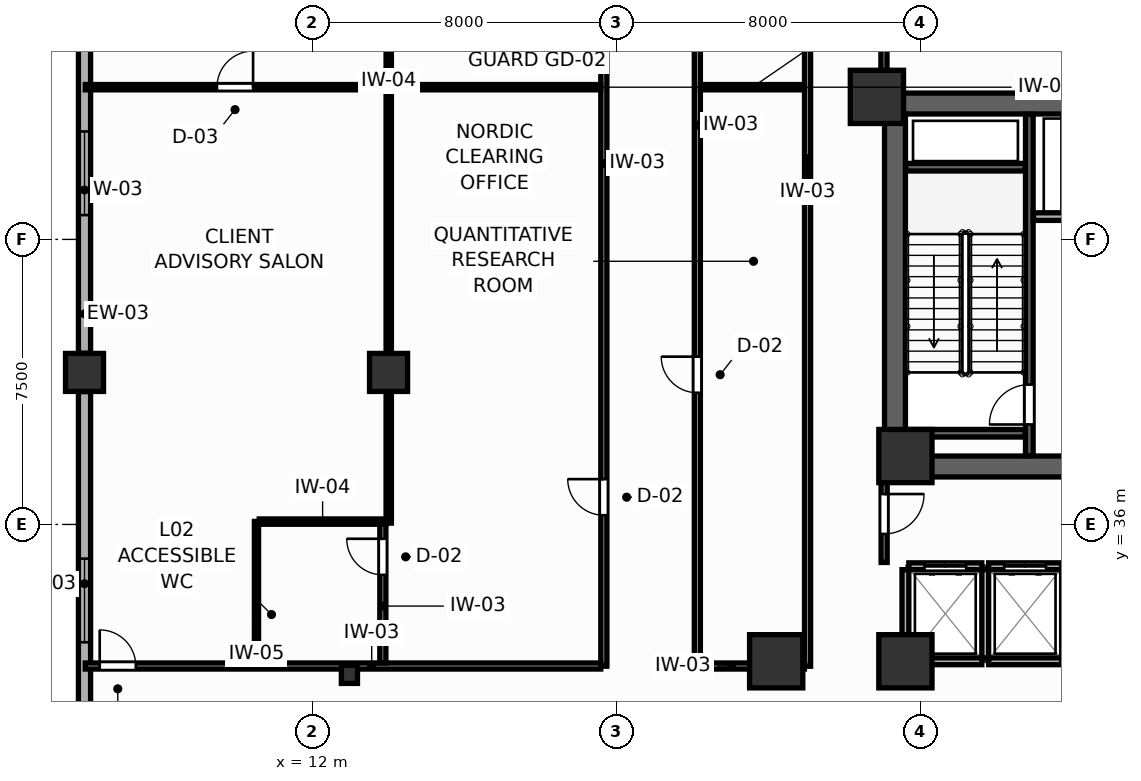
"""IFC4 building model, lengths in metres.
Left out: names, types, materials, properties, quantities, classifications, styles, units other than length and angle.
Written with IfcOpenShell. Run it as: python <this file> out.ifc"""

import sys

from ifc_helpers import new_model, si_unit, direction, frame, frame_2d, origin, origin_2d, place, context, subcontext, project, spatial, rectangle, i_section, extrude, source, transform, mapped, element, fill, save


model = new_model("IFC4")
c1 = context("Model", 3, precision=1e-05, world=origin(), true_north=direction((0.0, 1.0)))
c2 = subcontext(c1, "Body", "Model", "MODEL_VIEW")
j1 = project(units=[si_unit("LENGTHUNIT", "METRE"), si_unit("PLANEANGLEUNIT", "RADIAN")], contexts=[c1])
p1 = place(None, origin())
s1 = spatial("IfcSite", under=j1, at=p1, CompositionType="ELEMENT")
p2 = place(p1, origin())
s2 = spatial("IfcBuilding", under=s1, at=p2, CompositionType="ELEMENT")
p3 = place(p2, frame((0.0, 0.0, 9.6)))
s3 = spatial("IfcBuildingStorey", under=s2, at=p3, CompositionType="ELEMENT", Elevation=9.6)
p4 = place(p3, frame((27.05, 47.075, 0.0), z_axis=(0.0, 0.0, 1.0), x_axis=(1.0, 0.0, 0.0)))
e1 = element("IfcWall", 1, at=p4, inside=s3, PredefinedType="SHEAR", context=c2, shape_type="SweptSolid", body=[
    extrude(rectangle(XDim=17.9, YDim=0.55, at=frame_2d((8.95, 0.0))), origin(), (0.0, 0.0, 1.0), 4.8),
])
p5 = place(p3, frame((27.05, 37.525, 0.0), z_axis=(0.0, 0.0, 1.0), x_axis=(1.0, 0.0, 0.0)))
e2 = element("IfcWall", 2, at=p5, inside=s3, PredefinedType="SHEAR", context=c2, shape_type="SweptSolid", body=[
    extrude(rectangle(XDim=17.9, YDim=0.55, at=frame_2d((8.95, 0.0))), origin(), (0.0, 0.0, 1.0), 4.8),
])
p6 = place(p5, frame((4.975, 0.0, 0.0)))
e3 = element("IfcOpeningElement", 3, at=p6, cuts=e2, PredefinedType="OPENING", context=c2, shape_type="SweptSolid", body=[
    extrude(rectangle(XDim=1.05, YDim=2.1, at=frame_2d((0.525, 1.05))), frame((0.0, 0.285, 0.0), z_axis=(0.0, -1.0, 0.0), x_axis=(1.0, 0.0, 0.0)), (0.0, 0.0, 1.0), 0.57),
])
p7 = place(p5, frame((11.875, 0.0, 0.0)))
e4 = element("IfcOpeningElement", 4, at=p7, cuts=e2, PredefinedType="OPENING", context=c2, shape_type="SweptSolid", body=[
    extrude(rectangle(XDim=1.05, YDim=2.1, at=frame_2d((0.525, 1.05))), frame((0.0, 0.285, 0.0), z_axis=(0.0, -1.0, 0.0), x_axis=(1.0, 0.0, 0.0)), (0.0, 0.0, 1.0), 0.57),
])
p8 = place(p3, frame((27.325, 37.8, 0.0), z_axis=(0.0, 0.0, 1.0), x_axis=(0.0, 1.0, 0.0)))
e5 = element("IfcWall", 5, at=p8, inside=s3, PredefinedType="SHEAR", context=c2, shape_type="SweptSolid", body=[
    extrude(rectangle(XDim=9.0, YDim=0.55, at=frame_2d((4.5, 0.0))), origin(), (0.0, 0.0, 1.0), 4.8),
])
m1 = source(origin(), c2, "Body", "SweptSolid", [
    extrude(rectangle(XDim=1.4, YDim=1.4, at=origin_2d()), origin(), (0.0, 0.0, 1.0), 4.8),
])
for number, where, z_axis, x_axis in (
    (6, (26.85, 47.25, 0.0), (0.0, 0.0, 1.0), (1.0, 0.0, 0.0)),
    (7, (27.6, 37.8, 0.0), (0.0, 0.0, 1.0), (1.0, 0.0, 0.0)),
    (8, (27.6, 32.4, 0.0), (0.0, 0.0, 1.0), (1.0, 0.0, 0.0)),
    (9, (24.2, 32.4, 0.0), (0.0, 0.0, 1.0), (1.0, 0.0, 0.0)),
):
    element("IfcColumn", number, at=place(p3, frame(where, z_axis=z_axis, x_axis=x_axis)), inside=s3, PredefinedType="COLUMN", context=c2, shape_type="MappedRepresentation", body=[
        mapped(m1, transform((0.0, 0.0, 0.0), scale=1.0)),
    ])
m2 = source(origin(), c2, "Body", "SweptSolid", [
    extrude(rectangle(XDim=1.0, YDim=1.0, at=origin_2d()), origin(), (0.0, 0.0, 1.0), 4.8),
])
for number, where, z_axis, x_axis in (
    (10, (6.0, 40.0, 0.0), (0.0, 0.0, 1.0), (1.0, 0.0, 0.0)),
    (11, (14.0, 40.0, 0.0), (0.0, 0.0, 1.0), (1.0, 0.0, 0.0)),
):
    element("IfcColumn", number, at=place(p3, frame(where, z_axis=z_axis, x_axis=x_axis)), inside=s3, PredefinedType="COLUMN", context=c2, shape_type="MappedRepresentation", body=[
        mapped(m2, transform((0.0, 0.0, 0.0), scale=1.0)),
    ])
m3 = source(origin(), c2, "Body", "SweptSolid", [
    extrude(i_section(OverallWidth=0.424, OverallDepth=0.474, WebThickness=0.045, FlangeThickness=0.072, FilletRadius=0.015, at=origin_2d()), origin(), (0.0, 0.0, 1.0), 4.8),
])
p9 = place(p3, frame((12.97, 32.054, 0.0), z_axis=(0.0, 0.0, 1.0), x_axis=(1.0, 0.0, 0.0)))
e12 = element("IfcColumn", 12, at=p9, inside=s3, PredefinedType="COLUMN", context=c2, shape_type="MappedRepresentation", body=[
    mapped(m3, transform((0.0, 0.0, 0.0), scale=1.0)),
])
p10 = place(p3, frame((6.0, 28.505, 0.0), z_axis=(0.0, 0.0, 1.0), x_axis=(0.0, 1.0, 0.0)))
e13 = element("IfcWall", 13, at=p10, inside=s3, PredefinedType="SOLIDWALL", context=c2, shape_type="SweptSolid", body=[
    extrude(rectangle(XDim=10.99, YDim=0.32, at=frame_2d((5.495, 0.0))), origin(), (0.0, 0.0, 1.0), 4.35),
])
p11 = place(p10, frame((4.395, 0.0, 0.75)))
e14 = element("IfcOpeningElement", 14, at=p11, cuts=e13, PredefinedType="OPENING", context=c2, shape_type="SweptSolid", body=[
    extrude(rectangle(XDim=2.2, YDim=2.0, at=frame_2d((1.1, 1.0))), frame((0.0, 0.17, 0.0), z_axis=(0.0, -1.0, 0.0), x_axis=(1.0, 0.0, 0.0)), (0.0, 0.0, 1.0), 0.34),
])
p12 = place(p3, frame((6.0, 40.505, 0.0), z_axis=(0.0, 0.0, 1.0), x_axis=(0.0, 1.0, 0.0)))
e15 = element("IfcWall", 15, at=p12, inside=s3, PredefinedType="SOLIDWALL", context=c2, shape_type="SweptSolid", body=[
    extrude(rectangle(XDim=9.47, YDim=0.32, at=frame_2d((4.735, 0.0))), origin(), (0.0, 0.0, 1.0), 4.35),
])
p13 = place(p12, frame((3.635, 0.0, 0.75)))
e16 = element("IfcOpeningElement", 16, at=p13, cuts=e15, PredefinedType="OPENING", context=c2, shape_type="SweptSolid", body=[
    extrude(rectangle(XDim=2.2, YDim=2.0, at=frame_2d((1.1, 1.0))), frame((0.0, 0.17, 0.0), z_axis=(0.0, -1.0, 0.0), x_axis=(1.0, 0.0, 0.0)), (0.0, 0.0, 1.0), 0.34),
])
p14 = place(p3, frame((30.86, 37.81, 0.0), z_axis=(0.0, 0.0, 1.0), x_axis=(0.0, 1.0, 0.0)))
e17 = element("IfcWall", 17, at=p14, inside=s3, PredefinedType="SHEAR", context=c2, shape_type="SweptSolid", body=[
    extrude(rectangle(XDim=8.98, YDim=0.2, at=frame_2d((4.49, 0.0))), origin(), (0.0, 0.0, 1.0), 4.8),
])
p15 = place(p14, frame((0.82, 0.0, 0.0)))
e18 = element("IfcOpeningElement", 18, at=p15, cuts=e17, PredefinedType="OPENING", context=c2, shape_type="SweptSolid", body=[
    extrude(rectangle(XDim=1.05, YDim=2.1, at=frame_2d((0.525, 1.05))), frame((0.0, 0.11, 0.0), z_axis=(0.0, -1.0, 0.0), x_axis=(1.0, 0.0, 0.0)), (0.0, 0.0, 1.0), 0.22),
])
for number, where, z_axis, x_axis in (
    (19, (27.61, 45.4, 0.0), (0.0, 0.0, 1.0), (1.0, 0.0, 0.0)),
    (20, (27.61, 38.4, 0.0), (0.0, 0.0, 1.0), (1.0, 0.0, 0.0)),
):
    element("IfcWall", number, at=place(p3, frame(where, z_axis=z_axis, x_axis=x_axis)), inside=s3, PredefinedType="SHEAR", context=c2, shape_type="SweptSolid", body=[
        extrude(rectangle(XDim=3.14, YDim=0.2, at=frame_2d((1.57, 0.0))), origin(), (0.0, 0.0, 1.0), 4.8),
    ])
p16 = place(p3, frame((30.97, 44.1, 0.0), z_axis=(0.0, 0.0, 1.0), x_axis=(1.0, 0.0, 0.0)))
e21 = element("IfcWall", 21, at=p16, inside=s3, PredefinedType="PARTITIONING", context=c2, shape_type="SweptSolid", body=[
    extrude(rectangle(XDim=3.38, YDim=0.2, at=frame_2d((1.69, 0.0))), origin(), (0.0, 0.0, 1.0), 4.35),
])
p17 = place(p16, frame((0.9, 0.0, 0.0)))
e22 = element("IfcOpeningElement", 22, at=p17, cuts=e21, PredefinedType="OPENING", context=c2, shape_type="SweptSolid", body=[
    extrude(rectangle(XDim=1.2, YDim=2.1, at=frame_2d((0.6, 1.05))), frame((0.0, 0.11, 0.0), z_axis=(0.0, -1.0, 0.0), x_axis=(1.0, 0.0, 0.0)), (0.0, 0.0, 1.0), 0.22),
])
p18 = place(p3, frame((27.69, 34.9, 0.0), z_axis=(0.0, 0.0, 1.0), x_axis=(1.0, 0.0, 0.0)))
e23 = element("IfcWall", 23, at=p18, inside=s3, PredefinedType="PARTITIONING", context=c2, shape_type="SweptSolid", body=[
    extrude(rectangle(XDim=1.92, YDim=0.18, at=frame_2d((0.96, 0.0))), origin(), (0.0, 0.0, 1.0), 4.35),
])
p19 = place(p18, frame((0.41, 0.0, 0.0)))
e24 = element("IfcOpeningElement", 24, at=p19, cuts=e23, PredefinedType="OPENING", context=c2, shape_type="SweptSolid", body=[
    extrude(rectangle(XDim=1.1, YDim=2.1, at=frame_2d((0.55, 1.05))), frame((0.0, 0.1, 0.0), z_axis=(0.0, -1.0, 0.0), x_axis=(1.0, 0.0, 0.0)), (0.0, 0.0, 1.0), 0.2),
])
p20 = place(p3, frame((27.69, 32.4, 0.0), z_axis=(0.0, 0.0, 1.0), x_axis=(1.0, 0.0, 0.0)))
e25 = element("IfcWall", 25, at=p20, inside=s3, PredefinedType="PARTITIONING", context=c2, shape_type="SweptSolid", body=[
    extrude(rectangle(XDim=1.92, YDim=0.18, at=frame_2d((0.96, 0.0))), origin(), (0.0, 0.0, 1.0), 4.35),
])
p21 = place(p3, frame((27.6, 32.49, 0.0), z_axis=(0.0, 0.0, 1.0), x_axis=(0.0, 1.0, 0.0)))
e26 = element("IfcWall", 26, at=p21, inside=s3, PredefinedType="PARTITIONING", context=c2, shape_type="SweptSolid", body=[
    extrude(rectangle(XDim=2.32, YDim=0.18, at=frame_2d((1.16, 0.0))), origin(), (0.0, 0.0, 1.0), 4.35),
])
p22 = place(p3, frame((29.79, 34.9, 0.0), z_axis=(0.0, 0.0, 1.0), x_axis=(1.0, 0.0, 0.0)))
e27 = element("IfcWall", 27, at=p22, inside=s3, PredefinedType="PARTITIONING", context=c2, shape_type="SweptSolid", body=[
    extrude(rectangle(XDim=1.92, YDim=0.18, at=frame_2d((0.96, 0.0))), origin(), (0.0, 0.0, 1.0), 4.35),
])
p23 = place(p22, frame((0.41, 0.0, 0.0)))
e28 = element("IfcOpeningElement", 28, at=p23, cuts=e27, PredefinedType="OPENING", context=c2, shape_type="SweptSolid", body=[
    extrude(rectangle(XDim=1.1, YDim=2.1, at=frame_2d((0.55, 1.05))), frame((0.0, 0.1, 0.0), z_axis=(0.0, -1.0, 0.0), x_axis=(1.0, 0.0, 0.0)), (0.0, 0.0, 1.0), 0.2),
])
p24 = place(p3, frame((29.79, 32.4, 0.0), z_axis=(0.0, 0.0, 1.0), x_axis=(1.0, 0.0, 0.0)))
e29 = element("IfcWall", 29, at=p24, inside=s3, PredefinedType="PARTITIONING", context=c2, shape_type="SweptSolid", body=[
    extrude(rectangle(XDim=1.92, YDim=0.18, at=frame_2d((0.96, 0.0))), origin(), (0.0, 0.0, 1.0), 4.35),
])
p25 = place(p3, frame((29.7, 32.49, 0.0), z_axis=(0.0, 0.0, 1.0), x_axis=(0.0, 1.0, 0.0)))
e30 = element("IfcWall", 30, at=p25, inside=s3, PredefinedType="PARTITIONING", context=c2, shape_type="SweptSolid", body=[
    extrude(rectangle(XDim=2.32, YDim=0.18, at=frame_2d((1.16, 0.0))), origin(), (0.0, 0.0, 1.0), 4.35),
])
p26 = place(p3, frame((27.04, 35.0, 0.0), z_axis=(0.0, 0.0, 1.0), x_axis=(0.0, 1.0, 0.0)))
e31 = element("IfcWall", 31, at=p26, inside=s3, PredefinedType="PARTITIONING", context=c2, shape_type="SweptSolid", body=[
    extrude(rectangle(XDim=2.65, YDim=0.16, at=frame_2d((1.325, 0.0))), origin(), (0.0, 0.0, 1.0), 4.35),
])
p27 = place(p26, frame((0.75, 0.0, 0.0)))
e32 = element("IfcOpeningElement", 32, at=p27, cuts=e31, PredefinedType="OPENING", context=c2, shape_type="SweptSolid", body=[
    extrude(rectangle(XDim=1.05, YDim=2.1, at=frame_2d((0.525, 1.05))), frame((0.0, 0.09, 0.0), z_axis=(0.0, -1.0, 0.0), x_axis=(1.0, 0.0, 0.0)), (0.0, 0.0, 1.0), 0.18),
])
p28 = place(p3, frame((22.125, 32.27, 0.0), z_axis=(0.0, 0.0, 1.0), x_axis=(0.0, 1.0, 0.0)))
e33 = element("IfcWall", 33, at=p28, inside=s3, PredefinedType="PARTITIONING", context=c2, shape_type="SweptSolid", body=[
    extrude(rectangle(XDim=26.71, YDim=0.16, at=frame_2d((13.355, 0.0))), origin(), (0.0, 0.0, 1.0), 4.35),
])
p29 = place(p28, frame((7.195, 0.0, 0.0)))
e34 = element("IfcOpeningElement", 34, at=p29, cuts=e33, PredefinedType="OPENING", context=c2, shape_type="SweptSolid", body=[
    extrude(rectangle(XDim=0.95, YDim=2.05, at=frame_2d((0.475, 1.025))), frame((0.0, 0.09, 0.0), z_axis=(0.0, -1.0, 0.0), x_axis=(1.0, 0.0, 0.0)), (0.0, 0.0, 1.0), 0.18),
])
p30 = place(p28, frame((20.333, 0.0, 0.0)))
e35 = element("IfcOpeningElement", 35, at=p30, cuts=e33, PredefinedType="OPENING", context=c2, shape_type="SweptSolid", body=[
    extrude(rectangle(XDim=0.95, YDim=2.05, at=frame_2d((0.475, 1.025))), frame((0.0, 0.09, 0.0), z_axis=(0.0, -1.0, 0.0), x_axis=(1.0, 0.0, 0.0)), (0.0, 0.0, 1.0), 0.18),
])
p31 = place(p3, frame((25.025, 32.27, 0.0), z_axis=(0.0, 0.0, 1.0), x_axis=(0.0, 1.0, 0.0)))
e36 = element("IfcWall", 36, at=p31, inside=s3, PredefinedType="PARTITIONING", context=c2, shape_type="SweptSolid", body=[
    extrude(rectangle(XDim=26.71, YDim=0.16, at=frame_2d((13.355, 0.0))), origin(), (0.0, 0.0, 1.0), 4.35),
])
p32 = place(p3, frame((19.665, 32.27, 0.0), z_axis=(0.0, 0.0, 1.0), x_axis=(0.0, 1.0, 0.0)))
e37 = element("IfcWall", 37, at=p32, inside=s3, PredefinedType="PARTITIONING", context=c2, shape_type="SweptSolid", body=[
    extrude(rectangle(XDim=16.71, YDim=0.16, at=frame_2d((8.355, 0.0))), origin(), (0.0, 0.0, 1.0), 4.35),
])
p33 = place(p32, frame((3.972, 0.0, 0.0)))
e38 = element("IfcOpeningElement", 38, at=p33, cuts=e37, PredefinedType="OPENING", context=c2, shape_type="SweptSolid", body=[
    extrude(rectangle(XDim=0.95, YDim=2.05, at=frame_2d((0.475, 1.025))), frame((0.0, 0.09, 0.0), z_axis=(0.0, -1.0, 0.0), x_axis=(1.0, 0.0, 0.0)), (0.0, 0.0, 1.0), 0.18),
])
p34 = place(p3, frame((6.02, 32.275, 0.0), z_axis=(0.0, 0.0, 1.0), x_axis=(1.0, 0.0, 0.0)))
e39 = element("IfcWall", 39, at=p34, inside=s3, PredefinedType="PARTITIONING", context=c2, shape_type="SweptSolid", body=[
    extrude(rectangle(XDim=13.563, YDim=0.16, at=frame_2d((6.781, 0.0))), origin(), (0.0, 0.0, 1.0), 4.35),
])
p35 = place(p34, frame((0.38, 0.0, 0.0)))
e40 = element("IfcOpeningElement", 40, at=p35, cuts=e39, PredefinedType="OPENING", context=c2, shape_type="SweptSolid", body=[
    extrude(rectangle(XDim=0.95, YDim=2.05, at=frame_2d((0.475, 1.025))), frame((0.0, 0.09, 0.0), z_axis=(0.0, -1.0, 0.0), x_axis=(1.0, 0.0, 0.0)), (0.0, 0.0, 1.0), 0.18),
])
p36 = place(p3, frame((27.035, 47.34, 0.0), z_axis=(0.0, 0.0, 1.0), x_axis=(0.0, 1.0, 0.0)))
e41 = element("IfcWall", 41, at=p36, inside=s3, PredefinedType="PARTITIONING", context=c2, shape_type="SweptSolid", body=[
    extrude(rectangle(XDim=11.64, YDim=0.16, at=frame_2d((5.82, 0.0))), origin(), (0.0, 0.0, 1.0), 4.35),
])
p37 = place(p36, frame((5.238, 0.0, 0.0)))
e42 = element("IfcOpeningElement", 42, at=p37, cuts=e41, PredefinedType="OPENING", context=c2, shape_type="SweptSolid", body=[
    extrude(rectangle(XDim=0.95, YDim=2.05, at=frame_2d((0.475, 1.025))), frame((0.0, 0.09, 0.0), z_axis=(0.0, -1.0, 0.0), x_axis=(1.0, 0.0, 0.0)), (0.0, 0.0, 1.0), 0.18),
])
p38 = place(p3, frame((13.85, 32.357, 0.0), z_axis=(0.0, 0.0, 1.0), x_axis=(0.0, 1.0, 0.0)))
e43 = element("IfcWall", 43, at=p38, inside=s3, PredefinedType="PARTITIONING", context=c2, shape_type="SweptSolid", body=[
    extrude(rectangle(XDim=3.646, YDim=0.16, at=frame_2d((1.823, 0.0))), origin(), (0.0, 0.0, 1.0), 4.35),
])
p39 = place(p38, frame((2.316, 0.0, 0.0)))
e44 = element("IfcOpeningElement", 44, at=p39, cuts=e43, PredefinedType="OPENING", context=c2, shape_type="SweptSolid", body=[
    extrude(rectangle(XDim=0.95, YDim=2.05, at=frame_2d((0.475, 1.025))), frame((0.0, 0.09, 0.0), z_axis=(0.0, -1.0, 0.0), x_axis=(1.0, 0.0, 0.0)), (0.0, 0.0, 1.0), 0.18),
])
p40 = place(p3, frame((22.207, 32.275, 0.0), z_axis=(0.0, 0.0, 1.0), x_axis=(1.0, 0.0, 0.0)))
e45 = element("IfcWall", 45, at=p40, inside=s3, PredefinedType="PARTITIONING", context=c2, shape_type="SweptSolid", body=[
    extrude(rectangle(XDim=2.736, YDim=0.16, at=frame_2d((1.368, 0.0))), origin(), (0.0, 0.0, 1.0), 4.35),
])
p41 = place(p3, frame((14.005, 36.035, 0.0), z_axis=(0.0, 0.0, 1.0), x_axis=(0.0, 1.0, 0.0)))
e46 = element("IfcWall", 46, at=p41, inside=s3, PredefinedType="PARTITIONING", context=c2, shape_type="SweptSolid", body=[
    extrude(rectangle(XDim=22.945, YDim=0.14, at=frame_2d((11.473, 0.0))), origin(), (0.0, 0.0, 1.0), 4.35),
])
p42 = place(p41, frame((18.058, 0.0, 0.0)))
e47 = element("IfcOpeningElement", 47, at=p42, cuts=e46, PredefinedType="OPENING", context=c2, shape_type="SweptSolid", body=[
    extrude(rectangle(XDim=0.95, YDim=2.05, at=frame_2d((0.475, 1.025))), frame((0.0, 0.08, 0.0), z_axis=(0.0, -1.0, 0.0), x_axis=(1.0, 0.0, 0.0)), (0.0, 0.0, 1.0), 0.16),
])
p43 = place(p3, frame((6.02, 47.505, 0.0), z_axis=(0.0, 0.0, 1.0), x_axis=(1.0, 0.0, 0.0)))
e48 = element("IfcWall", 48, at=p43, inside=s3, PredefinedType="PARTITIONING", context=c2, shape_type="SweptSolid", body=[
    extrude(rectangle(XDim=13.563, YDim=0.14, at=frame_2d((6.781, 0.0))), origin(), (0.0, 0.0, 1.0), 4.35),
])
p44 = place(p43, frame((3.465, 0.0, 0.0)))
e49 = element("IfcOpeningElement", 49, at=p44, cuts=e48, PredefinedType="OPENING", context=c2, shape_type="SweptSolid", body=[
    extrude(rectangle(XDim=0.95, YDim=2.05, at=frame_2d((0.475, 1.025))), frame((0.0, 0.08, 0.0), z_axis=(0.0, -1.0, 0.0), x_axis=(1.0, 0.0, 0.0)), (0.0, 0.0, 1.0), 0.16),
])
p45 = place(p3, frame((10.525, 32.357, 0.0), z_axis=(0.0, 0.0, 1.0), x_axis=(0.0, 1.0, 0.0)))
e50 = element("IfcWall", 50, at=p45, inside=s3, PredefinedType="MOVABLE", context=c2, shape_type="SweptSolid", body=[
    extrude(rectangle(XDim=3.723, YDim=0.11, at=frame_2d((1.862, 0.0))), origin(), (0.0, 0.0, 1.0), 4.35),
])
p46 = place(p3, frame((10.597, 36.075, 0.0), z_axis=(0.0, 0.0, 1.0), x_axis=(1.0, 0.0, 0.0)))
e51 = element("IfcWall", 51, at=p46, inside=s3, PredefinedType="PARTITIONING", context=c2, shape_type="SweptSolid", body=[
    extrude(rectangle(XDim=3.336, YDim=0.14, at=frame_2d((1.668, 0.0))), origin(), (0.0, 0.0, 1.0), 4.35),
])
p47 = place(p3, frame((22.207, 47.505, 0.0), z_axis=(0.0, 0.0, 1.0), x_axis=(1.0, 0.0, 0.0)))
e52 = element("IfcWall", 52, at=p47, inside=s3, PredefinedType="PARTITIONING", context=c2, shape_type="SweptSolid", body=[
    extrude(rectangle(XDim=2.736, YDim=0.14, at=frame_2d((1.368, 0.0))), origin(), (0.0, 0.0, 1.0), 4.35),
])
p48 = place(p11, origin())
e53 = element("IfcWindow", 53, at=p48, inside=s3, PartitioningType="SINGLE_PANEL", PredefinedType="WINDOW", context=c2, shape_type="SweptSolid", body=[
    extrude(rectangle(XDim=2.2, YDim=2.0, at=frame_2d((1.1, 1.0))), frame((0.0, 0.03, 0.0), z_axis=(0.0, -1.0, 0.0), x_axis=(1.0, 0.0, 0.0)), (0.0, 0.0, 1.0), 0.06),
])
fill(e14, e53)
p49 = place(p13, origin())
e54 = element("IfcWindow", 54, at=p49, inside=s3, PartitioningType="SINGLE_PANEL", PredefinedType="WINDOW", context=c2, shape_type="SweptSolid", body=[
    extrude(rectangle(XDim=2.2, YDim=2.0, at=frame_2d((1.1, 1.0))), frame((0.0, 0.03, 0.0), z_axis=(0.0, -1.0, 0.0), x_axis=(1.0, 0.0, 0.0)), (0.0, 0.0, 1.0), 0.06),
])
fill(e16, e54)
p50 = place(p15, origin())
e55 = element("IfcDoor", 55, at=p50, inside=s3, OperationType="SINGLE_SWING_LEFT", PredefinedType="DOOR", context=c2, shape_type="SweptSolid", body=[
    extrude(rectangle(XDim=1.05, YDim=2.1, at=frame_2d((0.525, 1.05))), frame((0.0, 0.025, 0.0), z_axis=(0.0, -1.0, 0.0), x_axis=(1.0, 0.0, 0.0)), (0.0, 0.0, 1.0), 0.05),
])
fill(e18, e55)
p51 = place(p19, origin())
e56 = element("IfcDoor", 56, at=p51, inside=s3, OperationType="DOUBLE_DOOR_SLIDING", PredefinedType="DOOR", context=c2, shape_type="SweptSolid", body=[
    extrude(rectangle(XDim=1.1, YDim=2.1, at=frame_2d((0.55, 1.05))), frame((0.0, 0.025, 0.0), z_axis=(0.0, -1.0, 0.0), x_axis=(1.0, 0.0, 0.0)), (0.0, 0.0, 1.0), 0.05),
])
fill(e24, e56)
p52 = place(p23, origin())
e57 = element("IfcDoor", 57, at=p52, inside=s3, OperationType="DOUBLE_DOOR_SLIDING", PredefinedType="DOOR", context=c2, shape_type="SweptSolid", body=[
    extrude(rectangle(XDim=1.1, YDim=2.1, at=frame_2d((0.55, 1.05))), frame((0.0, 0.025, 0.0), z_axis=(0.0, -1.0, 0.0), x_axis=(1.0, 0.0, 0.0)), (0.0, 0.0, 1.0), 0.05),
])
fill(e28, e57)
p53 = place(p27, frame((1.05, 0.0, 0.0), z_axis=(0.0, 0.0, 1.0), x_axis=(-1.0, 0.0, 0.0)))
e58 = element("IfcDoor", 58, at=p53, inside=s3, OperationType="SINGLE_SWING_LEFT", PredefinedType="DOOR", context=c2, shape_type="SweptSolid", body=[
    extrude(rectangle(XDim=1.05, YDim=2.1, at=frame_2d((0.525, 1.05))), frame((0.0, 0.025, 0.0), z_axis=(0.0, -1.0, 0.0), x_axis=(1.0, 0.0, 0.0)), (0.0, 0.0, 1.0), 0.05),
])
fill(e32, e58)
p54 = place(p29, origin())
e59 = element("IfcDoor", 59, at=p54, inside=s3, OperationType="SINGLE_SWING_RIGHT", PredefinedType="DOOR", context=c2, shape_type="SweptSolid", body=[
    extrude(rectangle(XDim=0.95, YDim=2.05, at=frame_2d((0.475, 1.025))), frame((0.0, 0.025, 0.0), z_axis=(0.0, -1.0, 0.0), x_axis=(1.0, 0.0, 0.0)), (0.0, 0.0, 1.0), 0.05),
])
fill(e34, e59)
p55 = place(p33, origin())
e60 = element("IfcDoor", 60, at=p55, inside=s3, OperationType="SINGLE_SWING_RIGHT", PredefinedType="DOOR", context=c2, shape_type="SweptSolid", body=[
    extrude(rectangle(XDim=0.95, YDim=2.05, at=frame_2d((0.475, 1.025))), frame((0.0, 0.025, 0.0), z_axis=(0.0, -1.0, 0.0), x_axis=(1.0, 0.0, 0.0)), (0.0, 0.0, 1.0), 0.05),
])
fill(e38, e60)
p56 = place(p35, origin())
e61 = element("IfcDoor", 61, at=p56, inside=s3, OperationType="SINGLE_SWING_LEFT", PredefinedType="DOOR", context=c2, shape_type="SweptSolid", body=[
    extrude(rectangle(XDim=0.95, YDim=2.05, at=frame_2d((0.475, 1.025))), frame((0.0, 0.025, 0.0), z_axis=(0.0, -1.0, 0.0), x_axis=(1.0, 0.0, 0.0)), (0.0, 0.0, 1.0), 0.05),
])
fill(e40, e61)
p57 = place(p39, origin())
e62 = element("IfcDoor", 62, at=p57, inside=s3, OperationType="SINGLE_SWING_RIGHT", PredefinedType="DOOR", context=c2, shape_type="SweptSolid", body=[
    extrude(rectangle(XDim=0.95, YDim=2.05, at=frame_2d((0.475, 1.025))), frame((0.0, 0.025, 0.0), z_axis=(0.0, -1.0, 0.0), x_axis=(1.0, 0.0, 0.0)), (0.0, 0.0, 1.0), 0.05),
])
fill(e44, e62)
p58 = place(p44, origin())
e63 = element("IfcDoor", 63, at=p58, inside=s3, OperationType="SINGLE_SWING_RIGHT", PredefinedType="DOOR", context=c2, shape_type="SweptSolid", body=[
    extrude(rectangle(XDim=0.95, YDim=2.05, at=frame_2d((0.475, 1.025))), frame((0.0, 0.025, 0.0), z_axis=(0.0, -1.0, 0.0), x_axis=(1.0, 0.0, 0.0)), (0.0, 0.0, 1.0), 0.05),
])
fill(e49, e63)
save(model, sys.argv[1])
